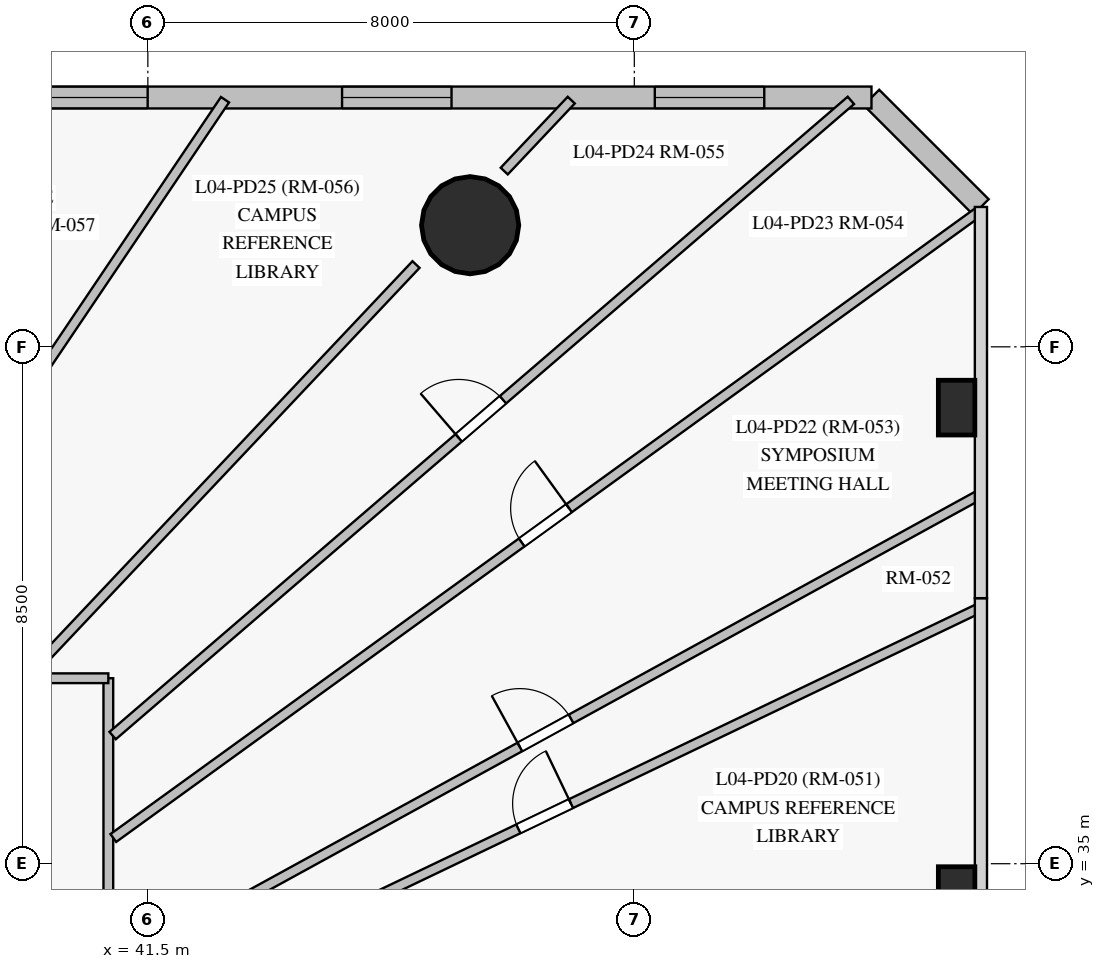
"""IFC4 building model, lengths in metres.
Left out: names, types, materials, properties, quantities, classifications, styles, units other than length and angle.
Written with IfcOpenShell. Run it as: python <this file> out.ifc"""

import sys

from ifc_helpers import new_model, si_unit, direction, frame, frame_2d, origin, origin_with_axes, origin_2d, place, context, subcontext, project, spatial, rectangle, circle, extrude, source, transform, mapped, element, fill, save


model = new_model("IFC4")
c1 = context("Model", 3, precision=1e-05, world=origin(), true_north=direction((0.0, 1.0)))
c2 = subcontext(c1, "Body", "Model", "MODEL_VIEW")
j1 = project(units=[si_unit("LENGTHUNIT", "METRE"), si_unit("PLANEANGLEUNIT", "RADIAN")], contexts=[c1])
p1 = place(None, origin())
s1 = spatial("IfcSite", under=j1, at=p1, CompositionType="ELEMENT")
p2 = place(p1, origin())
s2 = spatial("IfcBuilding", under=s1, at=p2, CompositionType="ELEMENT")
p3 = place(p2, frame((0.0, 0.0, 18.0)))
s3 = spatial("IfcBuildingStorey", under=s2, at=p3, CompositionType="ELEMENT", Elevation=18.0)
m1 = source(origin_with_axes(), c2, "Body", "SweptSolid", [
    extrude(circle(Radius=0.8, at=origin_2d()), origin(), (0.0, 0.0, 1.0), 4.5),
])
p4 = place(p3, frame((46.8, 45.5, 0.0), z_axis=(0.0, 0.0, 1.0), x_axis=(1.0, 0.0, 0.0)))
e1 = element("IfcColumn", 1, at=p4, inside=s3, PredefinedType="COLUMN", context=c2, shape_type="MappedRepresentation", body=[
    mapped(m1, transform((0.0, 0.0, 0.0), scale=1.0)),
])
m2 = source(origin_with_axes(), c2, "Body", "SweptSolid", [
    extrude(rectangle(XDim=0.6, YDim=0.9, at=origin_2d()), origin(), (0.0, 0.0, 1.0), 4.5),
])
for number, where, z_axis, x_axis in (
    (2, (54.8, 34.5, 0.0), (0.0, 0.0, 1.0), (1.0, 0.0, 0.0)),
    (3, (54.8, 42.5, 0.0), (0.0, 0.0, 1.0), (1.0, 0.0, 0.0)),
):
    element("IfcColumn", number, at=place(p3, frame(where, z_axis=z_axis, x_axis=x_axis)), inside=s3, PredefinedType="PILASTER", context=c2, shape_type="MappedRepresentation", body=[
        mapped(m2, transform((0.0, 0.0, 0.0), scale=1.0)),
    ])
p5 = place(p3, frame((55.2, 45.8, 0.0), z_axis=(0.0, 0.0, 1.0), x_axis=(-0.707106781187, 0.707106781187, 0.0)))
e4 = element("IfcWall", 4, at=p5, inside=s3, PredefinedType="SOLIDWALL", context=c2, shape_type="SweptSolid", body=[
    extrude(rectangle(XDim=2.546, YDim=0.36, at=frame_2d((1.273, 0.0))), origin(), (0.0, 0.0, 1.0), 4.225),
])
p6 = place(p3, frame((53.4, 47.6, 0.0), z_axis=(0.0, 0.0, 1.0), x_axis=(-1.0, 0.0, 0.0)))
e5 = element("IfcWall", 5, at=p6, inside=s3, PredefinedType="SOLIDWALL", context=c2, shape_type="SweptSolid", body=[
    extrude(rectangle(XDim=44.3, YDim=0.36, at=frame_2d((22.15, 0.0))), origin(), (0.0, 0.0, 1.0), 4.225),
])
p7 = place(p6, frame((1.763, 0.0, 0.85)))
e6 = element("IfcOpeningElement", 6, at=p7, cuts=e5, PredefinedType="OPENING", context=c2, shape_type="SweptSolid", body=[
    extrude(rectangle(XDim=1.8, YDim=2.2, at=frame_2d((0.9, 1.1))), frame((0.0, 0.19, 0.0), z_axis=(0.0, -1.0, 0.0), x_axis=(1.0, 0.0, 0.0)), (0.0, 0.0, 1.0), 0.38),
])
p8 = place(p6, frame((6.906, 0.0, 0.85)))
e7 = element("IfcOpeningElement", 7, at=p8, cuts=e5, PredefinedType="OPENING", context=c2, shape_type="SweptSolid", body=[
    extrude(rectangle(XDim=1.8, YDim=2.2, at=frame_2d((0.9, 1.1))), frame((0.0, 0.19, 0.0), z_axis=(0.0, -1.0, 0.0), x_axis=(1.0, 0.0, 0.0)), (0.0, 0.0, 1.0), 0.38),
])
p9 = place(p6, frame((11.903, 0.0, 0.85)))
e8 = element("IfcOpeningElement", 8, at=p9, cuts=e5, PredefinedType="OPENING", context=c2, shape_type="SweptSolid", body=[
    extrude(rectangle(XDim=1.8, YDim=2.2, at=frame_2d((0.9, 1.1))), frame((0.0, 0.19, 0.0), z_axis=(0.0, -1.0, 0.0), x_axis=(1.0, 0.0, 0.0)), (0.0, 0.0, 1.0), 0.38),
])
p10 = place(p6, frame((16.2, 0.0, 0.85)))
e9 = element("IfcOpeningElement", 9, at=p10, cuts=e5, PredefinedType="OPENING", context=c2, shape_type="SweptSolid", body=[
    extrude(rectangle(XDim=1.8, YDim=2.2, at=frame_2d((0.9, 1.1))), frame((0.0, 0.19, 0.0), z_axis=(0.0, -1.0, 0.0), x_axis=(1.0, 0.0, 0.0)), (0.0, 0.0, 1.0), 0.38),
])
p11 = place(p6, frame((23.82, 0.0, 0.85)))
e10 = element("IfcOpeningElement", 10, at=p11, cuts=e5, PredefinedType="OPENING", context=c2, shape_type="SweptSolid", body=[
    extrude(rectangle(XDim=1.8, YDim=2.2, at=frame_2d((0.9, 1.1))), frame((0.0, 0.19, 0.0), z_axis=(0.0, -1.0, 0.0), x_axis=(1.0, 0.0, 0.0)), (0.0, 0.0, 1.0), 0.38),
])
p12 = place(p6, frame((29.2, 0.0, 0.85)))
e11 = element("IfcOpeningElement", 11, at=p12, cuts=e5, PredefinedType="OPENING", context=c2, shape_type="SweptSolid", body=[
    extrude(rectangle(XDim=1.8, YDim=2.2, at=frame_2d((0.9, 1.1))), frame((0.0, 0.19, 0.0), z_axis=(0.0, -1.0, 0.0), x_axis=(1.0, 0.0, 0.0)), (0.0, 0.0, 1.0), 0.38),
])
p13 = place(p6, frame((34.113, 0.0, 0.85)))
e12 = element("IfcOpeningElement", 12, at=p13, cuts=e5, PredefinedType="OPENING", context=c2, shape_type="SweptSolid", body=[
    extrude(rectangle(XDim=1.8, YDim=2.2, at=frame_2d((0.9, 1.1))), frame((0.0, 0.19, 0.0), z_axis=(0.0, -1.0, 0.0), x_axis=(1.0, 0.0, 0.0)), (0.0, 0.0, 1.0), 0.38),
])
p14 = place(p6, frame((39.1, 0.0, 0.85)))
e13 = element("IfcOpeningElement", 13, at=p14, cuts=e5, PredefinedType="OPENING", context=c2, shape_type="SweptSolid", body=[
    extrude(rectangle(XDim=1.8, YDim=2.2, at=frame_2d((0.9, 1.1))), frame((0.0, 0.19, 0.0), z_axis=(0.0, -1.0, 0.0), x_axis=(1.0, 0.0, 0.0)), (0.0, 0.0, 1.0), 0.38),
])
p15 = place(p3, frame((40.85, 38.05, 0.0), z_axis=(0.0, 0.0, 1.0), x_axis=(0.0, -1.0, 0.0)))
e14 = element("IfcWall", 14, at=p15, inside=s3, PredefinedType="PARTITIONING", context=c2, shape_type="SweptSolid", body=[
    extrude(rectangle(XDim=18.508, YDim=0.16, at=frame_2d((9.254, 0.0))), origin(), (0.0, 0.0, 1.0), 2.725),
])
p16 = place(p15, frame((10.856, 0.0, 0.0)))
e15 = element("IfcOpeningElement", 15, at=p16, cuts=e14, PredefinedType="OPENING", context=c2, shape_type="SweptSolid", body=[
    extrude(rectangle(XDim=0.96, YDim=2.15, at=frame_2d((0.48, 1.075))), frame((0.0, 0.09, 0.0), z_axis=(0.0, -1.0, 0.0), x_axis=(1.0, 0.0, 0.0)), (0.0, 0.0, 1.0), 0.18),
])
p17 = place(p15, frame((8.695, 0.0, 0.0)))
e16 = element("IfcOpeningElement", 16, at=p17, cuts=e14, PredefinedType="OPENING", context=c2, shape_type="SweptSolid", body=[
    extrude(rectangle(XDim=0.96, YDim=2.15, at=frame_2d((0.48, 1.075))), frame((0.0, 0.09, 0.0), z_axis=(0.0, -1.0, 0.0), x_axis=(1.0, 0.0, 0.0)), (0.0, 0.0, 1.0), 0.18),
])
p18 = place(p15, frame((5.944, 0.0, 0.0)))
e17 = element("IfcOpeningElement", 17, at=p18, cuts=e14, PredefinedType="OPENING", context=c2, shape_type="SweptSolid", body=[
    extrude(rectangle(XDim=0.96, YDim=2.15, at=frame_2d((0.48, 1.075))), frame((0.0, 0.09, 0.0), z_axis=(0.0, -1.0, 0.0), x_axis=(1.0, 0.0, 0.0)), (0.0, 0.0, 1.0), 0.18),
])
p19 = place(p3, frame((40.932, 35.423, 0.0), z_axis=(0.0, 0.0, 1.0), x_axis=(0.810128766866, 0.586251977477, 0.0)))
e18 = element("IfcWall", 18, at=p19, inside=s3, PredefinedType="PARTITIONING", context=c2, shape_type="SweptSolid", body=[
    extrude(rectangle(XDim=17.566, YDim=0.16, at=frame_2d((8.783, 0.0))), origin(), (0.0, 0.0, 1.0), 4.225),
])
p20 = place(p19, frame((8.291, 0.0, 0.0)))
e19 = element("IfcOpeningElement", 19, at=p20, cuts=e18, PredefinedType="OPENING", context=c2, shape_type="SweptSolid", body=[
    extrude(rectangle(XDim=0.96, YDim=2.15, at=frame_2d((0.48, 1.075))), frame((0.0, 0.09, 0.0), z_axis=(0.0, -1.0, 0.0), x_axis=(1.0, 0.0, 0.0)), (0.0, 0.0, 1.0), 0.18),
])
p21 = place(p3, frame((40.932, 33.252, 0.0), z_axis=(0.0, 0.0, 1.0), x_axis=(0.876735097535, 0.480973563463, 0.0)))
e20 = element("IfcWall", 20, at=p21, inside=s3, PredefinedType="PARTITIONING", context=c2, shape_type="SweptSolid", body=[
    extrude(rectangle(XDim=16.237, YDim=0.16, at=frame_2d((8.118, 0.0))), origin(), (0.0, 0.0, 1.0), 4.225),
])
p22 = place(p21, frame((7.626, 0.0, 0.0)))
e21 = element("IfcOpeningElement", 21, at=p22, cuts=e20, PredefinedType="OPENING", context=c2, shape_type="SweptSolid", body=[
    extrude(rectangle(XDim=0.96, YDim=2.15, at=frame_2d((0.48, 1.075))), frame((0.0, 0.09, 0.0), z_axis=(0.0, -1.0, 0.0), x_axis=(1.0, 0.0, 0.0)), (0.0, 0.0, 1.0), 0.18),
])
p23 = place(p3, frame((40.921, 37.107, 0.0), z_axis=(0.0, 0.0, 1.0), x_axis=(0.758049080964, 0.65219750908, 0.0)))
e22 = element("IfcWall", 22, at=p23, inside=s3, PredefinedType="PARTITIONING", context=c2, shape_type="SweptSolid", body=[
    extrude(rectangle(XDim=16.016, YDim=0.16, at=frame_2d((8.008, 0.0))), origin(), (0.0, 0.0, 1.0), 2.725),
])
p24 = place(p23, frame((7.508, 0.0, 0.0)))
e23 = element("IfcOpeningElement", 23, at=p24, cuts=e22, PredefinedType="OPENING", context=c2, shape_type="SweptSolid", body=[
    extrude(rectangle(XDim=0.96, YDim=2.15, at=frame_2d((0.48, 1.075))), frame((0.0, 0.09, 0.0), z_axis=(0.0, -1.0, 0.0), x_axis=(1.0, 0.0, 0.0)), (0.0, 0.0, 1.0), 0.18),
])
p25 = place(p3, frame((40.918, 32.378, 0.0), z_axis=(0.0, 0.0, 1.0), x_axis=(0.901975422738, 0.431787374499, 0.0)))
e24 = element("IfcWall", 24, at=p25, inside=s3, PredefinedType="PARTITIONING", context=c2, shape_type="SweptSolid", body=[
    extrude(rectangle(XDim=15.799, YDim=0.16, at=frame_2d((7.899, 0.0))), origin(), (0.0, 0.0, 1.0), 4.225),
])
p26 = place(p25, frame((7.399, 0.0, 0.0)))
e25 = element("IfcOpeningElement", 25, at=p26, cuts=e24, PredefinedType="OPENING", context=c2, shape_type="SweptSolid", body=[
    extrude(rectangle(XDim=0.96, YDim=2.15, at=frame_2d((0.48, 1.075))), frame((0.0, 0.09, 0.0), z_axis=(0.0, -1.0, 0.0), x_axis=(1.0, 0.0, 0.0)), (0.0, 0.0, 1.0), 0.18),
])
p27 = place(p3, frame((25.4, 38.05, 0.0), z_axis=(0.0, 0.0, 1.0), x_axis=(1.0, 0.0, 0.0)))
e26 = element("IfcWall", 26, at=p27, inside=s3, PredefinedType="PARTITIONING", context=c2, shape_type="SweptSolid", body=[
    extrude(rectangle(XDim=15.45, YDim=0.16, at=frame_2d((7.725, 0.0))), origin(), (0.0, 0.0, 1.0), 4.225),
])
p28 = place(p27, frame((11.603, 0.0, 0.0)))
e27 = element("IfcOpeningElement", 27, at=p28, cuts=e26, PredefinedType="OPENING", context=c2, shape_type="SweptSolid", body=[
    extrude(rectangle(XDim=0.96, YDim=2.15, at=frame_2d((0.48, 1.075))), frame((0.0, 0.09, 0.0), z_axis=(0.0, -1.0, 0.0), x_axis=(1.0, 0.0, 0.0)), (0.0, 0.0, 1.0), 0.18),
])
p29 = place(p27, frame((9.567, 0.0, 0.0)))
e28 = element("IfcOpeningElement", 28, at=p29, cuts=e26, PredefinedType="OPENING", context=c2, shape_type="SweptSolid", body=[
    extrude(rectangle(XDim=0.96, YDim=2.15, at=frame_2d((0.48, 1.075))), frame((0.0, 0.09, 0.0), z_axis=(0.0, -1.0, 0.0), x_axis=(1.0, 0.0, 0.0)), (0.0, 0.0, 1.0), 0.18),
])
p30 = place(p27, frame((7.25, 0.0, 0.0)))
e29 = element("IfcOpeningElement", 29, at=p30, cuts=e26, PredefinedType="OPENING", context=c2, shape_type="SweptSolid", body=[
    extrude(rectangle(XDim=0.96, YDim=2.15, at=frame_2d((0.48, 1.075))), frame((0.0, 0.09, 0.0), z_axis=(0.0, -1.0, 0.0), x_axis=(1.0, 0.0, 0.0)), (0.0, 0.0, 1.0), 0.18),
])
p31 = place(p27, frame((3.843, 0.0, 0.0)))
e30 = element("IfcOpeningElement", 30, at=p31, cuts=e26, PredefinedType="OPENING", context=c2, shape_type="SweptSolid", body=[
    extrude(rectangle(XDim=0.96, YDim=2.15, at=frame_2d((0.48, 1.075))), frame((0.0, 0.09, 0.0), z_axis=(0.0, -1.0, 0.0), x_axis=(1.0, 0.0, 0.0)), (0.0, 0.0, 1.0), 0.18),
])
p32 = place(p3, frame((40.918, 30.223, 0.0), z_axis=(0.0, 0.0, 1.0), x_axis=(0.956535282376, 0.291616620873, 0.0)))
e31 = element("IfcWall", 31, at=p32, inside=s3, PredefinedType="PARTITIONING", context=c2, shape_type="SweptSolid", body=[
    extrude(rectangle(XDim=14.902, YDim=0.16, at=frame_2d((7.451, 0.0))), origin(), (0.0, 0.0, 1.0), 3.725),
])
p33 = place(p3, frame((36.412, 38.132, 0.0), z_axis=(0.0, 0.0, 1.0), x_axis=(0.558878812171, 0.829249343266, 0.0)))
e32 = element("IfcWall", 32, at=p33, inside=s3, PredefinedType="PARTITIONING", context=c2, shape_type="SweptSolid", body=[
    extrude(rectangle(XDim=11.374, YDim=0.16, at=frame_2d((5.687, 0.0))), origin(), (0.0, 0.0, 1.0), 4.225),
])
p34 = place(p3, frame((39.554, 38.121, 0.0), z_axis=(0.0, 0.0, 1.0), x_axis=(0.686483369139, 0.727145503937, 0.0)))
e33 = element("IfcWall", 33, at=p34, inside=s3, PredefinedType="PARTITIONING", context=c2, shape_type="SweptSolid", body=[
    extrude(rectangle(XDim=9.258, YDim=0.16, at=frame_2d((4.629, 0.0))), origin(), (0.0, 0.0, 1.0), 2.725),
])
p35 = place(p3, frame((47.361, 46.39, 0.0), z_axis=(0.0, 0.0, 1.0), x_axis=(0.686511880057, 0.727118586299, 0.0)))
e34 = element("IfcWall", 34, at=p35, inside=s3, PredefinedType="PARTITIONING", context=c2, shape_type="SweptSolid", body=[
    extrude(rectangle(XDim=1.605, YDim=0.16, at=frame_2d((0.803, 0.0))), origin(), (0.0, 0.0, 1.0), 4.225),
])
m3 = source(origin_with_axes(), c2, "Body", "SweptSolid", [
    extrude(rectangle(XDim=1.8, YDim=2.2, at=frame_2d((0.9, 1.1))), frame((0.0, 0.03, 0.0), z_axis=(0.0, -1.0, 0.0), x_axis=(1.0, 0.0, 0.0)), (0.0, 0.0, 1.0), 0.06),
])
p36 = place(p7, origin())
e35 = element("IfcWindow", 35, at=p36, inside=s3, PartitioningType="SINGLE_PANEL", PredefinedType="WINDOW", context=c2, shape_type="MappedRepresentation", body=[
    mapped(m3, transform((0.0, 0.0, 0.0), scale=1.0)),
])
fill(e6, e35)
p37 = place(p8, origin())
e36 = element("IfcWindow", 36, at=p37, inside=s3, PartitioningType="SINGLE_PANEL", PredefinedType="WINDOW", context=c2, shape_type="MappedRepresentation", body=[
    mapped(m3, transform((0.0, 0.0, 0.0), scale=1.0)),
])
fill(e7, e36)
p38 = place(p9, origin())
e37 = element("IfcWindow", 37, at=p38, inside=s3, PartitioningType="SINGLE_PANEL", PredefinedType="WINDOW", context=c2, shape_type="MappedRepresentation", body=[
    mapped(m3, transform((0.0, 0.0, 0.0), scale=1.0)),
])
fill(e8, e37)
m4 = source(origin_with_axes(), c2, "Body", "SweptSolid", [
    extrude(rectangle(XDim=0.96, YDim=2.15, at=frame_2d((0.48, 1.075))), frame((0.0, 0.025, 0.0), z_axis=(0.0, -1.0, 0.0), x_axis=(1.0, 0.0, 0.0)), (0.0, 0.0, 1.0), 0.05),
])
p39 = place(p26, origin())
e38 = element("IfcDoor", 38, at=p39, inside=s3, OperationType="SINGLE_SWING_RIGHT", PredefinedType="DOOR", context=c2, shape_type="MappedRepresentation", body=[
    mapped(m4, transform((0.0, 0.0, 0.0), scale=1.0)),
])
fill(e25, e38)
p40 = place(p22, origin())
e39 = element("IfcDoor", 39, at=p40, inside=s3, OperationType="SINGLE_SWING_LEFT", PredefinedType="DOOR", context=c2, shape_type="MappedRepresentation", body=[
    mapped(m4, transform((0.0, 0.0, 0.0), scale=1.0)),
])
fill(e21, e39)
p41 = place(p20, origin())
e40 = element("IfcDoor", 40, at=p41, inside=s3, OperationType="SINGLE_SWING_RIGHT", PredefinedType="DOOR", context=c2, shape_type="MappedRepresentation", body=[
    mapped(m4, transform((0.0, 0.0, 0.0), scale=1.0)),
])
fill(e19, e40)
p42 = place(p24, origin())
e41 = element("IfcDoor", 41, at=p42, inside=s3, OperationType="SINGLE_SWING_LEFT", PredefinedType="DOOR", context=c2, shape_type="MappedRepresentation", body=[
    mapped(m4, transform((0.0, 0.0, 0.0), scale=1.0)),
])
fill(e23, e41)
save(model, sys.argv[1])
